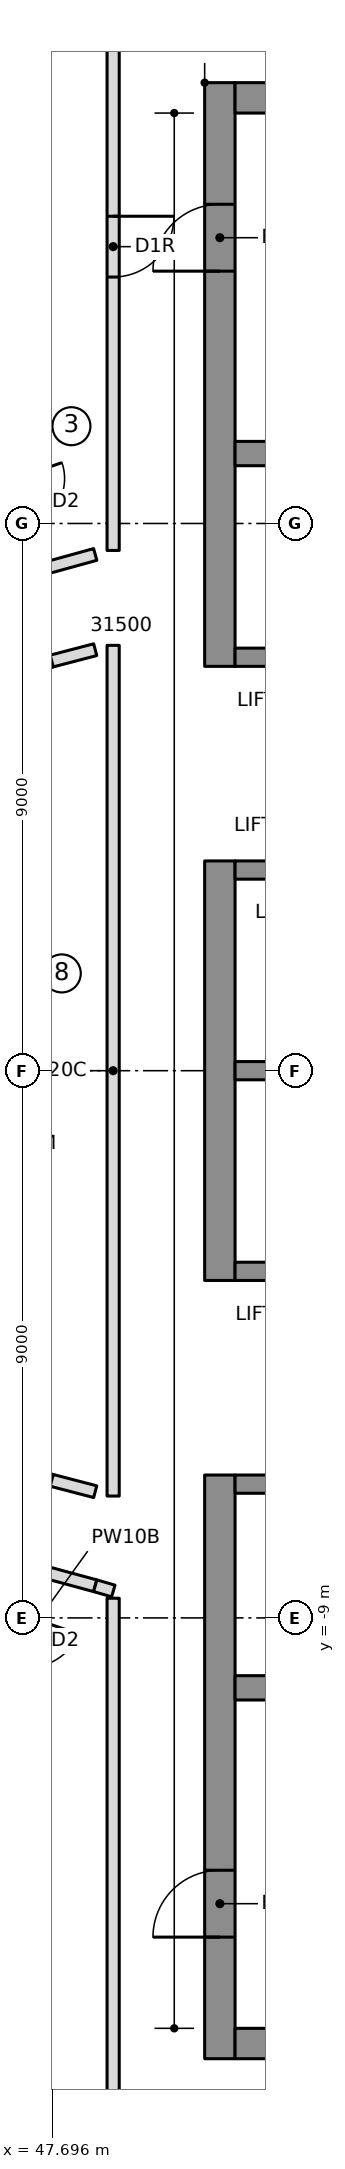
"""IFC4 building model, lengths in metres.
Left out: names, types, materials, properties, quantities, classifications, styles, units other than length and angle.
Written with IfcOpenShell. Run it as: python <this file> out.ifc"""

import sys

from ifc_helpers import new_model, si_unit, direction, frame, frame_2d, origin, place, context, subcontext, project, spatial, rectangle, extrude, element, fill, save


model = new_model("IFC4")
c1 = context("Model", 3, precision=1e-05, world=origin(), true_north=direction((0.0, 1.0)))
c2 = subcontext(c1, "Body", "Model", "MODEL_VIEW")
j1 = project(units=[si_unit("LENGTHUNIT", "METRE"), si_unit("PLANEANGLEUNIT", "RADIAN")], contexts=[c1])
p1 = place(None, origin())
s1 = spatial("IfcSite", under=j1, at=p1, CompositionType="ELEMENT")
p2 = place(p1, origin())
s2 = spatial("IfcBuilding", under=s1, at=p2, CompositionType="ELEMENT")
p3 = place(p2, frame((0.0, 0.0, 292.75)))
s3 = spatial("IfcBuildingStorey", under=s2, at=p3, CompositionType="ELEMENT", Elevation=292.75)
p4 = place(p3, frame((50.45, 6.65, 0.0), z_axis=(0.0, 0.0, 1.0), x_axis=(0.0, 1.0, 0.0)))
e1 = element("IfcWall", 1, at=p4, inside=s3, PredefinedType="SHEAR", context=c2, shape_type="SweptSolid", body=[
    extrude(rectangle(XDim=9.6, YDim=0.5, at=frame_2d((4.8, 0.0))), origin(), (0.0, 0.0, 1.0), 3.55),
])
p5 = place(p4, frame((6.5, 0.0, 0.0)))
e2 = element("IfcOpeningElement", 2, at=p5, cuts=e1, PredefinedType="OPENING", context=c2, shape_type="SweptSolid", body=[
    extrude(rectangle(XDim=1.1, YDim=2.1, at=frame_2d((0.55, 1.05))), frame((0.0, 0.26, 0.0), z_axis=(0.0, -1.0, 0.0), x_axis=(1.0, 0.0, 0.0)), (0.0, 0.0, 1.0), 0.52),
])
p6 = place(p3, frame((50.45, -3.45, 0.0), z_axis=(0.0, 0.0, 1.0), x_axis=(0.0, 1.0, 0.0)))
e3 = element("IfcWall", 3, at=p6, inside=s3, PredefinedType="SHEAR", context=c2, shape_type="SweptSolid", body=[
    extrude(rectangle(XDim=6.9, YDim=0.5, at=frame_2d((3.45, 0.0))), origin(), (0.0, 0.0, 1.0), 3.55),
])
p7 = place(p3, frame((50.45, -16.25, 0.0), z_axis=(0.0, 0.0, 1.0), x_axis=(0.0, 1.0, 0.0)))
e4 = element("IfcWall", 4, at=p7, inside=s3, PredefinedType="SHEAR", context=c2, shape_type="SweptSolid", body=[
    extrude(rectangle(XDim=9.6, YDim=0.5, at=frame_2d((4.8, 0.0))), origin(), (0.0, 0.0, 1.0), 3.55),
])
p8 = place(p7, frame((2.0, 0.0, 0.0)))
e5 = element("IfcOpeningElement", 5, at=p8, cuts=e4, PredefinedType="OPENING", context=c2, shape_type="SweptSolid", body=[
    extrude(rectangle(XDim=1.1, YDim=2.1, at=frame_2d((0.55, 1.05))), frame((0.0, 0.26, 0.0), z_axis=(0.0, -1.0, 0.0), x_axis=(1.0, 0.0, 0.0)), (0.0, 0.0, 1.0), 0.52),
])
for number, where, z_axis, x_axis in (
    (6, (50.7, 16.0, 0.0), (0.0, 0.0, 1.0), (1.0, 0.0, 0.0)),
    (7, (50.7, -16.0, 0.0), (0.0, 0.0, 1.0), (1.0, 0.0, 0.0)),
):
    element("IfcWall", number, at=place(p3, frame(where, z_axis=z_axis, x_axis=x_axis)), inside=s3, PredefinedType="SHEAR", context=c2, shape_type="SweptSolid", body=[
        extrude(rectangle(XDim=13.52, YDim=0.5, at=frame_2d((6.76, 0.0))), origin(), (0.0, 0.0, 1.0), 3.55),
    ])
p9 = place(p3, frame((50.7, 10.15, 0.0), z_axis=(0.0, 0.0, 1.0), x_axis=(1.0, 0.0, 0.0)))
e8 = element("IfcWall", 8, at=p9, inside=s3, PredefinedType="SHEAR", context=c2, shape_type="SweptSolid", body=[
    extrude(rectangle(XDim=13.02, YDim=0.4, at=frame_2d((6.51, 0.0))), origin(), (0.0, 0.0, 1.0), 3.55),
])
p10 = place(p9, frame((0.7, 0.0, 0.0)))
e9 = element("IfcOpeningElement", 9, at=p10, cuts=e8, PredefinedType="OPENING", context=c2, shape_type="SweptSolid", body=[
    extrude(rectangle(XDim=1.1, YDim=2.1, at=frame_2d((0.55, 1.05))), frame((0.0, 0.21, 0.0), z_axis=(0.0, -1.0, 0.0), x_axis=(1.0, 0.0, 0.0)), (0.0, 0.0, 1.0), 0.42),
])
p11 = place(p9, frame((3.5, 0.0, 0.0)))
e10 = element("IfcOpeningElement", 10, at=p11, cuts=e8, PredefinedType="OPENING", context=c2, shape_type="SweptSolid", body=[
    extrude(rectangle(XDim=1.1, YDim=2.1, at=frame_2d((0.55, 1.05))), frame((0.0, 0.21, 0.0), z_axis=(0.0, -1.0, 0.0), x_axis=(1.0, 0.0, 0.0)), (0.0, 0.0, 1.0), 0.42),
])
p12 = place(p3, frame((50.7, -10.15, 0.0), z_axis=(0.0, 0.0, 1.0), x_axis=(1.0, 0.0, 0.0)))
e11 = element("IfcWall", 11, at=p12, inside=s3, PredefinedType="SHEAR", context=c2, shape_type="SweptSolid", body=[
    extrude(rectangle(XDim=13.02, YDim=0.4, at=frame_2d((6.51, 0.0))), origin(), (0.0, 0.0, 1.0), 3.55),
])
p13 = place(p3, frame((50.7, 0.0, 0.0), z_axis=(0.0, 0.0, 1.0), x_axis=(1.0, 0.0, 0.0)))
e12 = element("IfcWall", 12, at=p13, inside=s3, PredefinedType="SHEAR", context=c2, shape_type="SweptSolid", body=[
    extrude(rectangle(XDim=10.9, YDim=0.3, at=frame_2d((5.45, 0.0))), origin(), (0.0, 0.0, 1.0), 3.55),
])
p14 = place(p3, frame((50.7, 3.3, 0.0), z_axis=(0.0, 0.0, 1.0), x_axis=(1.0, 0.0, 0.0)))
e13 = element("IfcWall", 13, at=p14, inside=s3, PredefinedType="SHEAR", context=c2, shape_type="SweptSolid", body=[
    extrude(rectangle(XDim=10.9, YDim=0.3, at=frame_2d((5.45, 0.0))), origin(), (0.0, 0.0, 1.0), 3.55),
])
p15 = place(p14, frame((0.7, 0.0, 0.0)))
e14 = element("IfcOpeningElement", 14, at=p15, cuts=e13, PredefinedType="OPENING", context=c2, shape_type="SweptSolid", body=[
    extrude(rectangle(XDim=1.1, YDim=2.1, at=frame_2d((0.55, 1.05))), frame((0.0, 0.16, 0.0), z_axis=(0.0, -1.0, 0.0), x_axis=(1.0, 0.0, 0.0)), (0.0, 0.0, 1.0), 0.32),
])
p16 = place(p14, frame((3.5, 0.0, 0.0)))
e15 = element("IfcOpeningElement", 15, at=p16, cuts=e13, PredefinedType="OPENING", context=c2, shape_type="SweptSolid", body=[
    extrude(rectangle(XDim=1.1, YDim=2.1, at=frame_2d((0.55, 1.05))), frame((0.0, 0.16, 0.0), z_axis=(0.0, -1.0, 0.0), x_axis=(1.0, 0.0, 0.0)), (0.0, 0.0, 1.0), 0.32),
])
p17 = place(p14, frame((6.4, 0.0, 0.0)))
e16 = element("IfcOpeningElement", 16, at=p17, cuts=e13, PredefinedType="OPENING", context=c2, shape_type="SweptSolid", body=[
    extrude(rectangle(XDim=0.9, YDim=2.1, at=frame_2d((0.45, 1.05))), frame((0.0, 0.16, 0.0), z_axis=(0.0, -1.0, 0.0), x_axis=(1.0, 0.0, 0.0)), (0.0, 0.0, 1.0), 0.32),
])
p18 = place(p14, frame((9.2, 0.0, 0.0)))
e17 = element("IfcOpeningElement", 17, at=p18, cuts=e13, PredefinedType="OPENING", context=c2, shape_type="SweptSolid", body=[
    extrude(rectangle(XDim=0.9, YDim=2.1, at=frame_2d((0.45, 1.05))), frame((0.0, 0.16, 0.0), z_axis=(0.0, -1.0, 0.0), x_axis=(1.0, 0.0, 0.0)), (0.0, 0.0, 1.0), 0.32),
])
p19 = place(p3, frame((50.7, 6.8, 0.0), z_axis=(0.0, 0.0, 1.0), x_axis=(1.0, 0.0, 0.0)))
e18 = element("IfcWall", 18, at=p19, inside=s3, PredefinedType="SHEAR", context=c2, shape_type="SweptSolid", body=[
    extrude(rectangle(XDim=10.9, YDim=0.3, at=frame_2d((5.45, 0.0))), origin(), (0.0, 0.0, 1.0), 3.55),
])
p20 = place(p19, frame((6.4, 0.0, 0.0)))
e19 = element("IfcOpeningElement", 19, at=p20, cuts=e18, PredefinedType="OPENING", context=c2, shape_type="SweptSolid", body=[
    extrude(rectangle(XDim=0.9, YDim=2.1, at=frame_2d((0.45, 1.05))), frame((0.0, 0.16, 0.0), z_axis=(0.0, -1.0, 0.0), x_axis=(1.0, 0.0, 0.0)), (0.0, 0.0, 1.0), 0.32),
])
p21 = place(p19, frame((9.2, 0.0, 0.0)))
e20 = element("IfcOpeningElement", 20, at=p21, cuts=e18, PredefinedType="OPENING", context=c2, shape_type="SweptSolid", body=[
    extrude(rectangle(XDim=0.9, YDim=2.1, at=frame_2d((0.45, 1.05))), frame((0.0, 0.16, 0.0), z_axis=(0.0, -1.0, 0.0), x_axis=(1.0, 0.0, 0.0)), (0.0, 0.0, 1.0), 0.32),
])
p22 = place(p3, frame((50.7, -3.3, 0.0), z_axis=(0.0, 0.0, 1.0), x_axis=(1.0, 0.0, 0.0)))
e21 = element("IfcWall", 21, at=p22, inside=s3, PredefinedType="SHEAR", context=c2, shape_type="SweptSolid", body=[
    extrude(rectangle(XDim=10.9, YDim=0.3, at=frame_2d((5.45, 0.0))), origin(), (0.0, 0.0, 1.0), 3.55),
])
p23 = place(p22, frame((9.1, 0.0, 0.0)))
e22 = element("IfcOpeningElement", 22, at=p23, cuts=e21, PredefinedType="OPENING", context=c2, shape_type="SweptSolid", body=[
    extrude(rectangle(XDim=1.1, YDim=2.1, at=frame_2d((0.55, 1.05))), frame((0.0, 0.16, 0.0), z_axis=(0.0, -1.0, 0.0), x_axis=(1.0, 0.0, 0.0)), (0.0, 0.0, 1.0), 0.32),
])
p24 = place(p3, frame((50.7, -6.8, 0.0), z_axis=(0.0, 0.0, 1.0), x_axis=(1.0, 0.0, 0.0)))
e23 = element("IfcWall", 23, at=p24, inside=s3, PredefinedType="SHEAR", context=c2, shape_type="SweptSolid", body=[
    extrude(rectangle(XDim=10.9, YDim=0.3, at=frame_2d((5.45, 0.0))), origin(), (0.0, 0.0, 1.0), 3.55),
])
p25 = place(p24, frame((6.3, 0.0, 0.0)))
e24 = element("IfcOpeningElement", 24, at=p25, cuts=e23, PredefinedType="OPENING", context=c2, shape_type="SweptSolid", body=[
    extrude(rectangle(XDim=1.1, YDim=2.1, at=frame_2d((0.55, 1.05))), frame((0.0, 0.16, 0.0), z_axis=(0.0, -1.0, 0.0), x_axis=(1.0, 0.0, 0.0)), (0.0, 0.0, 1.0), 0.32),
])
p26 = place(p24, frame((9.1, 0.0, 0.0)))
e25 = element("IfcOpeningElement", 25, at=p26, cuts=e23, PredefinedType="OPENING", context=c2, shape_type="SweptSolid", body=[
    extrude(rectangle(XDim=1.1, YDim=2.1, at=frame_2d((0.55, 1.05))), frame((0.0, 0.16, 0.0), z_axis=(0.0, -1.0, 0.0), x_axis=(1.0, 0.0, 0.0)), (0.0, 0.0, 1.0), 0.32),
])
p27 = place(p24, frame((0.8, 0.0, 0.0)))
e26 = element("IfcOpeningElement", 26, at=p27, cuts=e23, PredefinedType="OPENING", context=c2, shape_type="SweptSolid", body=[
    extrude(rectangle(XDim=0.9, YDim=2.1, at=frame_2d((0.45, 1.05))), frame((0.0, 0.16, 0.0), z_axis=(0.0, -1.0, 0.0), x_axis=(1.0, 0.0, 0.0)), (0.0, 0.0, 1.0), 0.32),
])
p28 = place(p24, frame((3.6, 0.0, 0.0)))
e27 = element("IfcOpeningElement", 27, at=p28, cuts=e23, PredefinedType="OPENING", context=c2, shape_type="SweptSolid", body=[
    extrude(rectangle(XDim=0.9, YDim=2.1, at=frame_2d((0.45, 1.05))), frame((0.0, 0.16, 0.0), z_axis=(0.0, -1.0, 0.0), x_axis=(1.0, 0.0, 0.0)), (0.0, 0.0, 1.0), 0.32),
])
p29 = place(p3, frame((47.684, -6.738, 0.0), z_axis=(0.0, 0.0, 1.0), x_axis=(-0.962403613575, 0.271623424206, 0.0)))
e28 = element("IfcWall", 28, at=p29, inside=s3, PredefinedType="PARTITIONING", context=c2, shape_type="SweptSolid", body=[
    extrude(rectangle(XDim=3.374, YDim=0.2, at=frame_2d((1.687, 0.0))), origin(), (0.0, 0.0, 1.0), 3.25),
])
p30 = place(p29, frame((1.187, 0.0, 0.0)))
e29 = element("IfcOpeningElement", 29, at=p30, cuts=e28, PredefinedType="OPENING", context=c2, shape_type="SweptSolid", body=[
    extrude(rectangle(XDim=1.0, YDim=2.1, at=frame_2d((0.5, 1.05))), frame((0.0, 0.11, 0.0), z_axis=(0.0, -1.0, 0.0), x_axis=(1.0, 0.0, 0.0)), (0.0, 0.0, 1.0), 0.22),
])
p31 = place(p3, frame((44.437, 5.821, 0.0), z_axis=(0.0, 0.0, 1.0), x_axis=(0.962403613575, 0.271623424206, 0.0)))
e30 = element("IfcWall", 30, at=p31, inside=s3, PredefinedType="PARTITIONING", context=c2, shape_type="SweptSolid", body=[
    extrude(rectangle(XDim=3.374, YDim=0.2, at=frame_2d((1.687, 0.0))), origin(), (0.0, 0.0, 1.0), 3.25),
])
p32 = place(p3, frame((48.4, 8.49, 0.0), z_axis=(0.0, 0.0, 1.0), x_axis=(-0.964024043021, -0.265815056905, 0.0)))
e31 = element("IfcWall", 31, at=p32, inside=s3, PredefinedType="PARTITIONING", context=c2, shape_type="SweptSolid", body=[
    extrude(rectangle(XDim=4.532, YDim=0.2, at=frame_2d((2.266, 0.0))), origin(), (0.0, 0.0, 1.0), 3.25),
])
p33 = place(p3, frame((44.031, -7.286, 0.0), z_axis=(0.0, 0.0, 1.0), x_axis=(0.965107760304, -0.261853033211, 0.0)))
e32 = element("IfcWall", 32, at=p33, inside=s3, PredefinedType="PARTITIONING", context=c2, shape_type="SweptSolid", body=[
    extrude(rectangle(XDim=4.527, YDim=0.2, at=frame_2d((2.263, 0.0))), origin(), (0.0, 0.0, 1.0), 3.25),
])
p34 = place(p33, frame((1.851, 0.0, 0.0)))
e33 = element("IfcOpeningElement", 33, at=p34, cuts=e32, PredefinedType="OPENING", context=c2, shape_type="SweptSolid", body=[
    extrude(rectangle(XDim=1.5, YDim=2.1, at=frame_2d((0.75, 1.05))), frame((0.0, 0.11, 0.0), z_axis=(0.0, -1.0, 0.0), x_axis=(1.0, 0.0, 0.0)), (0.0, 0.0, 1.0), 0.22),
])
for number, where, z_axis, x_axis in (
    (34, (47.684, 6.738, 0.0), (0.0, 0.0, 1.0), (0.968, 0.253, 0.0)),
    (35, (48.4, -6.924, 0.0), (0.0, 0.0, 1.0), (-0.968, 0.253, 0.0)),
):
    element("IfcWall", number, at=place(p3, frame(where, z_axis=z_axis, x_axis=x_axis)), inside=s3, PredefinedType="PARTITIONING", context=c2, shape_type="SweptSolid", body=[
        extrude(rectangle(XDim=0.74, YDim=0.2, at=frame_2d((0.37, 0.0))), origin(), (0.0, 0.0, 1.0), 3.25),
    ])
p35 = place(p3, frame((48.695, 6.996, 0.0), z_axis=(0.0, 0.0, 1.0), x_axis=(0.0, -1.0, 0.0)))
e36 = element("IfcWall", 36, at=p35, inside=s3, PredefinedType="PARTITIONING", context=c2, shape_type="SweptSolid", body=[
    extrude(rectangle(XDim=13.992, YDim=0.2, at=frame_2d((6.996, 0.0))), origin(), (0.0, 0.0, 1.0), 3.25),
])
p36 = place(p3, frame((48.695, 18.553, 0.0), z_axis=(0.0, 0.0, 1.0), x_axis=(0.0, -1.0, 0.0)))
e37 = element("IfcWall", 37, at=p36, inside=s3, PredefinedType="PARTITIONING", context=c2, shape_type="SweptSolid", body=[
    extrude(rectangle(XDim=9.997, YDim=0.2, at=frame_2d((4.998, 0.0))), origin(), (0.0, 0.0, 1.0), 3.25),
])
p37 = place(p36, frame((4.5, 0.0, 0.0)))
e38 = element("IfcOpeningElement", 38, at=p37, cuts=e37, PredefinedType="OPENING", context=c2, shape_type="SweptSolid", body=[
    extrude(rectangle(XDim=1.0, YDim=2.1, at=frame_2d((0.5, 1.05))), frame((0.0, 0.11, 0.0), z_axis=(0.0, -1.0, 0.0), x_axis=(1.0, 0.0, 0.0)), (0.0, 0.0, 1.0), 0.22),
])
p38 = place(p3, frame((48.4, -8.471, 0.0), z_axis=(0.0, 0.0, 1.0), x_axis=(0.960807456803, -0.277216577701, 0.0)))
e39 = element("IfcWall", 39, at=p38, inside=s3, PredefinedType="PARTITIONING", context=c2, shape_type="SweptSolid", body=[
    extrude(rectangle(XDim=0.31, YDim=0.2, at=frame_2d((0.155, 0.0))), origin(), (0.0, 0.0, 1.0), 3.25),
])
p39 = place(p3, frame((48.695, -8.676, 0.0), z_axis=(0.0, 0.0, 1.0), x_axis=(0.0, -1.0, 0.0)))
e40 = element("IfcWall", 40, at=p39, inside=s3, PredefinedType="PARTITIONING", context=c2, shape_type="SweptSolid", body=[
    extrude(rectangle(XDim=9.877, YDim=0.2, at=frame_2d((4.938, 0.0))), origin(), (0.0, 0.0, 1.0), 3.25),
])
p40 = place(p37, origin())
e41 = element("IfcDoor", 41, at=p40, inside=s3, OperationType="SINGLE_SWING_RIGHT", PredefinedType="DOOR", context=c2, shape_type="SweptSolid", body=[
    extrude(rectangle(XDim=1.0, YDim=2.1, at=frame_2d((0.5, 1.05))), frame((0.0, 0.025, 0.0), z_axis=(0.0, -1.0, 0.0), x_axis=(1.0, 0.0, 0.0)), (0.0, 0.0, 1.0), 0.05),
])
fill(e38, e41)
p41 = place(p5, origin())
e42 = element("IfcDoor", 42, at=p41, inside=s3, OperationType="SINGLE_SWING_RIGHT", PredefinedType="DOOR", context=c2, shape_type="SweptSolid", body=[
    extrude(rectangle(XDim=1.1, YDim=2.1, at=frame_2d((0.55, 1.05))), frame((0.0, 0.025, 0.0), z_axis=(0.0, -1.0, 0.0), x_axis=(1.0, 0.0, 0.0)), (0.0, 0.0, 1.0), 0.05),
])
fill(e2, e42)
p42 = place(p8, origin())
e43 = element("IfcDoor", 43, at=p42, inside=s3, OperationType="SINGLE_SWING_RIGHT", PredefinedType="DOOR", context=c2, shape_type="SweptSolid", body=[
    extrude(rectangle(XDim=1.1, YDim=2.1, at=frame_2d((0.55, 1.05))), frame((0.0, 0.025, 0.0), z_axis=(0.0, -1.0, 0.0), x_axis=(1.0, 0.0, 0.0)), (0.0, 0.0, 1.0), 0.05),
])
fill(e5, e43)
save(model, sys.argv[1])
